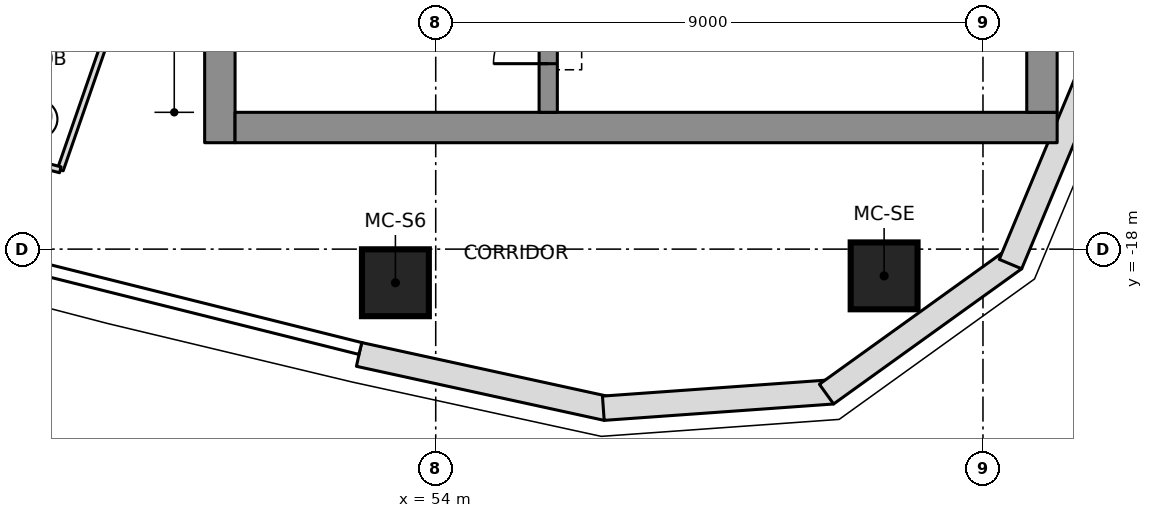
"""IFC4 building model, lengths in metres.
Left out: names, types, materials, properties, quantities, classifications, styles, units other than length and angle.
Written with IfcOpenShell. Run it as: python <this file> out.ifc"""

import sys

from ifc_helpers import new_model, si_unit, direction, frame, frame_2d, origin, origin_2d, place, context, subcontext, project, spatial, polyline, rectangle, outline, extrude, element, fill, save


model = new_model("IFC4")
c1 = context("Model", 3, precision=1e-05, world=origin(), true_north=direction((0.0, 1.0)))
c2 = subcontext(c1, "Body", "Model", "MODEL_VIEW")
j1 = project(units=[si_unit("LENGTHUNIT", "METRE"), si_unit("PLANEANGLEUNIT", "RADIAN")], contexts=[c1])
p1 = place(None, origin())
s1 = spatial("IfcSite", under=j1, at=p1, CompositionType="ELEMENT")
p2 = place(p1, origin())
s2 = spatial("IfcBuilding", under=s1, at=p2, CompositionType="ELEMENT")
p3 = place(p2, frame((0.0, 0.0, 289.2)))
s3 = spatial("IfcBuildingStorey", under=s2, at=p3, CompositionType="ELEMENT", Elevation=289.2)
p4 = place(p3, frame((50.45, -16.25, 0.0), z_axis=(0.0, 0.0, 1.0), x_axis=(0.0, 1.0, 0.0)))
e1 = element("IfcWall", 1, at=p4, inside=s3, PredefinedType="SHEAR", context=c2, shape_type="SweptSolid", body=[
    extrude(rectangle(XDim=9.6, YDim=0.5, at=frame_2d((4.8, 0.0))), origin(), (0.0, 0.0, 1.0), 3.55),
])
p5 = place(p4, frame((2.0, 0.0, 0.0)))
e2 = element("IfcOpeningElement", 2, at=p5, cuts=e1, PredefinedType="OPENING", context=c2, shape_type="SweptSolid", body=[
    extrude(rectangle(XDim=1.1, YDim=2.1, at=frame_2d((0.55, 1.05))), frame((0.0, 0.26, 0.0), z_axis=(0.0, -1.0, 0.0), x_axis=(1.0, 0.0, 0.0)), (0.0, 0.0, 1.0), 0.52),
])
p6 = place(p3, frame((50.7, -16.0, 0.0), z_axis=(0.0, 0.0, 1.0), x_axis=(1.0, 0.0, 0.0)))
e3 = element("IfcWall", 3, at=p6, inside=s3, PredefinedType="SHEAR", context=c2, shape_type="SweptSolid", body=[
    extrude(rectangle(XDim=13.52, YDim=0.5, at=frame_2d((6.76, 0.0))), origin(), (0.0, 0.0, 1.0), 3.55),
])
p7 = place(p3, frame((63.97, -15.75, 0.0), z_axis=(0.0, 0.0, 1.0), x_axis=(0.0, 1.0, 0.0)))
e4 = element("IfcWall", 4, at=p7, inside=s3, PredefinedType="SHEAR", context=c2, shape_type="SweptSolid", body=[
    extrude(rectangle(XDim=8.847, YDim=0.5, at=frame_2d((4.423, 0.0))), origin(), (0.0, 0.0, 1.0), 3.55),
])
p8 = place(p3, frame((55.85, -15.75, 0.0), z_axis=(0.0, 0.0, 1.0), x_axis=(0.0, 1.0, 0.0)))
e5 = element("IfcWall", 5, at=p8, inside=s3, PredefinedType="SHEAR", context=c2, shape_type="SweptSolid", body=[
    extrude(rectangle(XDim=5.4, YDim=0.3, at=frame_2d((2.7, 0.0))), origin(), (0.0, 0.0, 1.0), 3.55),
])
p9 = place(p8, frame((3.6, 0.0, 0.0)))
e6 = element("IfcOpeningElement", 6, at=p9, cuts=e5, PredefinedType="OPENING", context=c2, shape_type="SweptSolid", body=[
    extrude(rectangle(XDim=1.1, YDim=2.1, at=frame_2d((0.55, 1.05))), frame((0.0, 0.16, 0.0), z_axis=(0.0, -1.0, 0.0), x_axis=(1.0, 0.0, 0.0)), (0.0, 0.0, 1.0), 0.32),
])
p10 = place(p8, frame((0.8, 0.0, 0.0)))
e7 = element("IfcOpeningElement", 7, at=p10, cuts=e5, PredefinedType="OPENING", context=c2, shape_type="SweptSolid", body=[
    extrude(rectangle(XDim=0.9, YDim=2.1, at=frame_2d((0.45, 1.05))), frame((0.0, 0.16, 0.0), z_axis=(0.0, -1.0, 0.0), x_axis=(1.0, 0.0, 0.0)), (0.0, 0.0, 1.0), 0.32),
])
for number, where, z_axis, x_axis in (
    (8, (53.337, -18.553, 0.0), (0.0, 0.0, 1.0), (1.0, 0.0, 0.0)),
    (9, (61.374, -18.44, 0.0), (0.0, 0.0, 1.0), (1.0, 0.0, 0.0)),
):
    element("IfcColumn", number, at=place(p3, frame(where, z_axis=z_axis, x_axis=x_axis)), inside=s3, PredefinedType="COLUMN", context=c2, shape_type="SweptSolid", body=[
        extrude(rectangle(XDim=1.1, YDim=1.1, at=origin_2d()), origin(), (0.0, 0.0, 1.0), 3.55),
    ])
p11 = place(p3, frame((52.738, -19.732, 0.0), z_axis=(0.0, 0.0, 1.0), x_axis=(0.977020225348, -0.213146614471, 0.0)))
e10 = element("IfcWall", 10, at=p11, inside=s3, PredefinedType="NOTDEFINED", context=c2, shape_type="SweptSolid", body=[
    extrude(outline(polyline([(0.0, -0.2), (4.171, -0.2), (4.113, 0.2), (0.0, 0.2), (0.0, -0.2)])), origin(), (0.0, 0.0, 1.0), 3.25),
])
p12 = place(p3, frame((56.785, -20.615, 0.0), z_axis=(0.0, 0.0, 1.0), x_axis=(0.99746272096, 0.071190731806, 0.0)))
e11 = element("IfcWall", 11, at=p12, inside=s3, PredefinedType="NOTDEFINED", context=c2, shape_type="SweptSolid", body=[
    extrude(outline(polyline([(-0.029, -0.2), (3.753, -0.2), (3.64, 0.2), (0.029, 0.2), (-0.029, -0.2)])), origin(), (0.0, 0.0, 1.0), 3.25),
])
p13 = place(p3, frame((60.472, -20.352, 0.0), z_axis=(0.0, 0.0, 1.0), x_axis=(0.811962548682, 0.583709533533, 0.0)))
e12 = element("IfcWall", 12, at=p13, inside=s3, PredefinedType="NOTDEFINED", context=c2, shape_type="SweptSolid", body=[
    extrude(outline(polyline([(-0.057, -0.2), (3.753, -0.2), (3.64, 0.2), (0.057, 0.2), (-0.057, -0.2)])), origin(), (0.0, 0.0, 1.0), 3.25),
])
p14 = place(p3, frame((63.474, -18.194, 0.0), z_axis=(0.0, 0.0, 1.0), x_axis=(0.385285857918, 0.922797273343, 0.0)))
e13 = element("IfcWall", 13, at=p14, inside=s3, PredefinedType="NOTDEFINED", context=c2, shape_type="SweptSolid", body=[
    extrude(outline(polyline([(-0.057, -0.2), (3.726, -0.2), (3.667, 0.2), (0.057, 0.2), (-0.057, -0.2)])), origin(), (0.0, 0.0, 1.0), 3.25),
])
p15 = place(p3, frame((44.874, -17.579, 0.0), z_axis=(0.0, 0.0, 1.0), x_axis=(0.327705598625, 0.944779890043, 0.0)))
e14 = element("IfcWall", 14, at=p15, inside=s3, PredefinedType="PARTITIONING", context=c2, shape_type="SweptSolid", body=[
    extrude(rectangle(XDim=9.61, YDim=0.2, at=frame_2d((4.805, 0.0))), origin(), (0.0, 0.0, 1.0), 3.25),
])
p16 = place(p3, frame((48.583, -14.516, 0.0), z_axis=(0.0, 0.0, 1.0), x_axis=(-0.327695604762, -0.944783356447, 0.0)))
e15 = element("IfcWall", 15, at=p16, inside=s3, PredefinedType="PARTITIONING", context=c2, shape_type="SweptSolid", body=[
    extrude(rectangle(XDim=2.307, YDim=0.1, at=frame_2d((1.154, 0.0))), origin(), (0.0, 0.0, 1.0), 3.25),
])
p17 = place(p3, frame((47.826, -16.696, 0.0), z_axis=(0.0, 0.0, 1.0), x_axis=(-0.967650770907, 0.25229345129, 0.0)))
e16 = element("IfcWall", 16, at=p17, inside=s3, PredefinedType="PARTITIONING", context=c2, shape_type="SweptSolid", body=[
    extrude(rectangle(XDim=1.934, YDim=0.1, at=frame_2d((0.967, 0.0))), origin(), (0.0, 0.0, 1.0), 3.25),
])
p18 = place(p10, origin())
e17 = element("IfcDoor", 17, at=p18, inside=s3, OperationType="SINGLE_SWING_LEFT", PredefinedType="DOOR", context=c2, shape_type="SweptSolid", body=[
    extrude(rectangle(XDim=0.9, YDim=2.1, at=frame_2d((0.45, 1.05))), frame((0.0, 0.025, 0.0), z_axis=(0.0, -1.0, 0.0), x_axis=(1.0, 0.0, 0.0)), (0.0, 0.0, 1.0), 0.05),
])
fill(e7, e17)
save(model, sys.argv[1])
